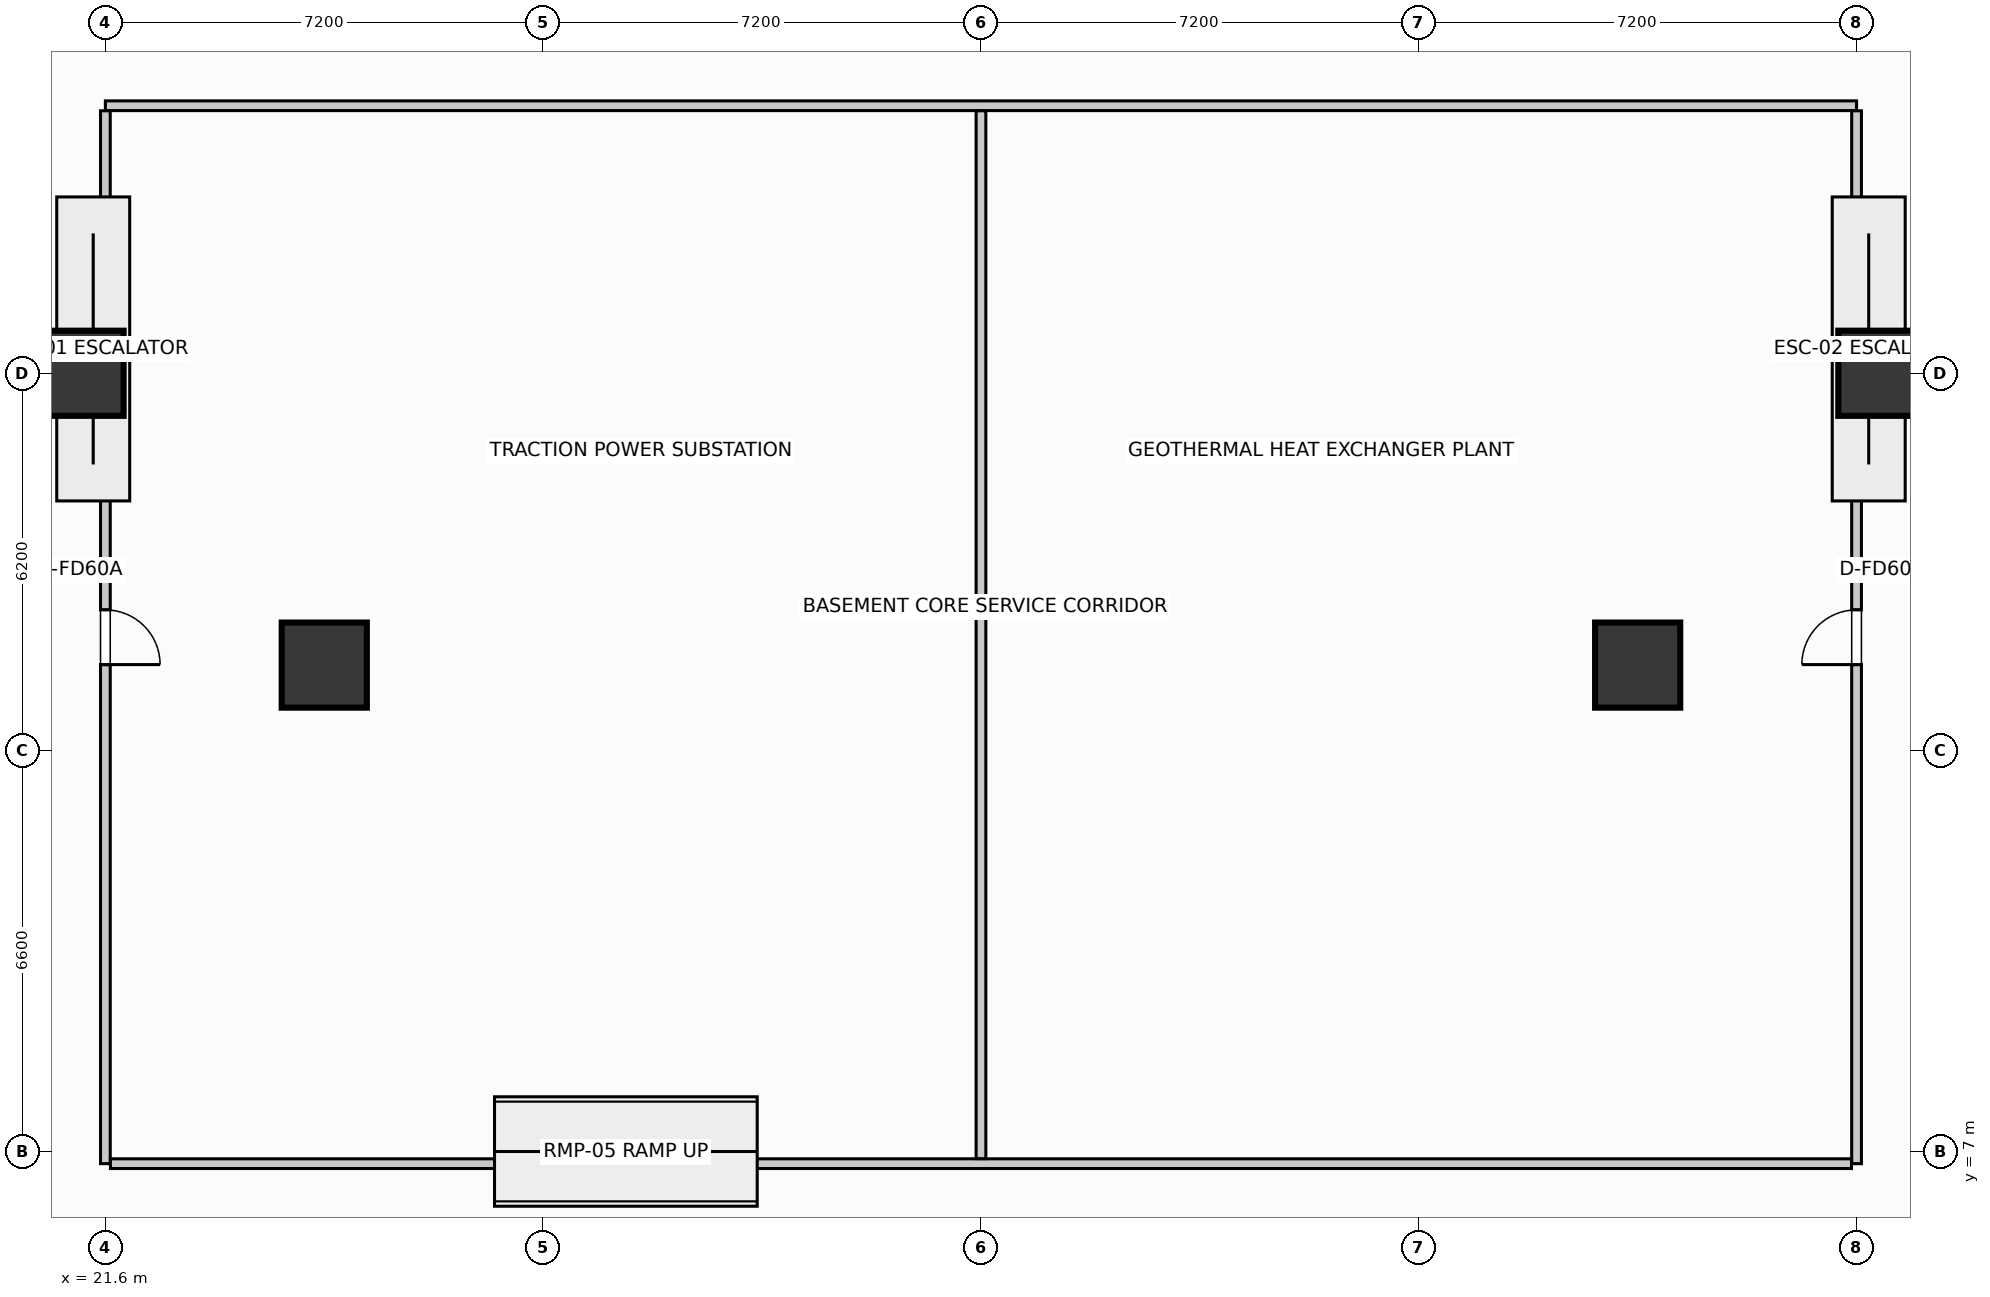
"""IFC4 building model, lengths in metres.
Left out: names, types, materials, properties, quantities, classifications, styles, units other than length and angle.
Written with IfcOpenShell. Run it as: python <this file> out.ifc"""

import sys

from ifc_helpers import new_model, si_unit, direction, frame, frame_2d, origin, origin_2d, place, context, subcontext, project, spatial, rectangle, extrude, element, fill, save


model = new_model("IFC4")
c1 = context("Model", 3, precision=1e-05, world=origin(), true_north=direction((0.0, 1.0)))
c2 = subcontext(c1, "Body", "Model", "MODEL_VIEW")
j1 = project(units=[si_unit("LENGTHUNIT", "METRE"), si_unit("PLANEANGLEUNIT", "RADIAN")], contexts=[c1])
p1 = place(None, origin())
s1 = spatial("IfcSite", under=j1, at=p1, CompositionType="ELEMENT")
p2 = place(p1, origin())
s2 = spatial("IfcBuilding", under=s1, at=p2, CompositionType="ELEMENT")
p3 = place(p2, frame((0.0, 0.0, -5.4)))
s3 = spatial("IfcBuildingStorey", under=s2, at=p3, CompositionType="ELEMENT", Elevation=-5.4)
for number, where, z_axis, x_axis in (
    (1, (50.8, 19.8, 0.0), (0.0, 0.0, 1.0), (1.0, 0.0, 0.0)),
    (2, (21.2, 19.8, 0.0), (0.0, 0.0, 1.0), (1.0, 0.0, 0.0)),
    (3, (25.2, 15.0, 0.0), (0.0, 0.0, 1.0), (1.0, 0.0, 0.0)),
    (4, (46.8, 15.0, 0.0), (0.0, 0.0, 1.0), (1.0, 0.0, 0.0)),
):
    element("IfcColumn", number, at=place(p3, frame(where, z_axis=z_axis, x_axis=x_axis)), inside=s3, PredefinedType="COLUMN", context=c2, shape_type="SweptSolid", body=[
        extrude(rectangle(XDim=1.4, YDim=1.4, at=origin_2d()), origin(), (0.0, 0.0, 1.0), 5.4),
    ])
p4 = place(p3, frame((21.6, 24.2, 0.0), z_axis=(0.0, 0.0, 1.0), x_axis=(1.0, 0.0, 0.0)))
e5 = element("IfcWall", 5, at=p4, inside=s3, PredefinedType="PARTITIONING", context=c2, shape_type="SweptSolid", body=[
    extrude(rectangle(XDim=28.8, YDim=0.16, at=frame_2d((14.4, 0.0))), origin(), (0.0, 0.0, 1.0), 5.085),
])
p5 = place(p3, frame((21.6, 6.8, 0.0), z_axis=(0.0, 0.0, 1.0), x_axis=(0.0, 1.0, 0.0)))
e6 = element("IfcWall", 6, at=p5, inside=s3, PredefinedType="PARTITIONING", context=c2, shape_type="SweptSolid", body=[
    extrude(rectangle(XDim=17.317, YDim=0.16, at=frame_2d((8.658, 0.0))), origin(), (0.0, 0.0, 1.0), 5.085),
])
p6 = place(p5, frame((8.208, 0.0, 0.0)))
e7 = element("IfcOpeningElement", 7, at=p6, cuts=e6, PredefinedType="OPENING", context=c2, shape_type="SweptSolid", body=[
    extrude(rectangle(XDim=0.9, YDim=2.0, at=frame_2d((0.45, 1.0))), frame((0.0, 0.09, 0.0), z_axis=(0.0, -1.0, 0.0), x_axis=(1.0, 0.0, 0.0)), (0.0, 0.0, 1.0), 0.18),
])
p7 = place(p3, frame((50.4, 6.8, 0.0), z_axis=(0.0, 0.0, 1.0), x_axis=(0.0, 1.0, 0.0)))
e8 = element("IfcWall", 8, at=p7, inside=s3, PredefinedType="PARTITIONING", context=c2, shape_type="SweptSolid", body=[
    extrude(rectangle(XDim=17.317, YDim=0.16, at=frame_2d((8.658, 0.0))), origin(), (0.0, 0.0, 1.0), 5.085),
])
p8 = place(p7, frame((8.208, 0.0, 0.0)))
e9 = element("IfcOpeningElement", 9, at=p8, cuts=e8, PredefinedType="OPENING", context=c2, shape_type="SweptSolid", body=[
    extrude(rectangle(XDim=0.9, YDim=2.0, at=frame_2d((0.45, 1.0))), frame((0.0, 0.09, 0.0), z_axis=(0.0, -1.0, 0.0), x_axis=(1.0, 0.0, 0.0)), (0.0, 0.0, 1.0), 0.18),
])
p9 = place(p3, frame((21.683, 6.8, 0.0), z_axis=(0.0, 0.0, 1.0), x_axis=(1.0, 0.0, 0.0)))
e10 = element("IfcWall", 10, at=p9, inside=s3, PredefinedType="PARTITIONING", context=c2, shape_type="SweptSolid", body=[
    extrude(rectangle(XDim=28.634, YDim=0.16, at=frame_2d((14.317, 0.0))), origin(), (0.0, 0.0, 1.0), 5.085),
])
p10 = place(p3, frame((36.0, 6.883, 0.0), z_axis=(0.0, 0.0, 1.0), x_axis=(0.0, 1.0, 0.0)))
e11 = element("IfcWall", 11, at=p10, inside=s3, PredefinedType="PARTITIONING", context=c2, shape_type="SweptSolid", body=[
    extrude(rectangle(XDim=17.234, YDim=0.16, at=frame_2d((8.617, 0.0))), origin(), (0.0, 0.0, 1.0), 5.085),
])
p11 = place(p6, frame((0.9, 0.0, 0.0), z_axis=(0.0, 0.0, 1.0), x_axis=(-1.0, 0.0, 0.0)))
e12 = element("IfcDoor", 12, at=p11, inside=s3, OperationType="SINGLE_SWING_RIGHT", PredefinedType="DOOR", context=c2, shape_type="SweptSolid", body=[
    extrude(rectangle(XDim=0.9, YDim=2.0, at=frame_2d((0.45, 1.0))), frame((0.0, 0.025, 0.0), z_axis=(0.0, -1.0, 0.0), x_axis=(1.0, 0.0, 0.0)), (0.0, 0.0, 1.0), 0.05),
])
fill(e7, e12)
p12 = place(p8, origin())
e13 = element("IfcDoor", 13, at=p12, inside=s3, OperationType="SINGLE_SWING_LEFT", PredefinedType="DOOR", context=c2, shape_type="SweptSolid", body=[
    extrude(rectangle(XDim=0.9, YDim=2.0, at=frame_2d((0.45, 1.0))), frame((0.0, 0.025, 0.0), z_axis=(0.0, -1.0, 0.0), x_axis=(1.0, 0.0, 0.0)), (0.0, 0.0, 1.0), 0.05),
])
fill(e9, e13)
save(model, sys.argv[1])
